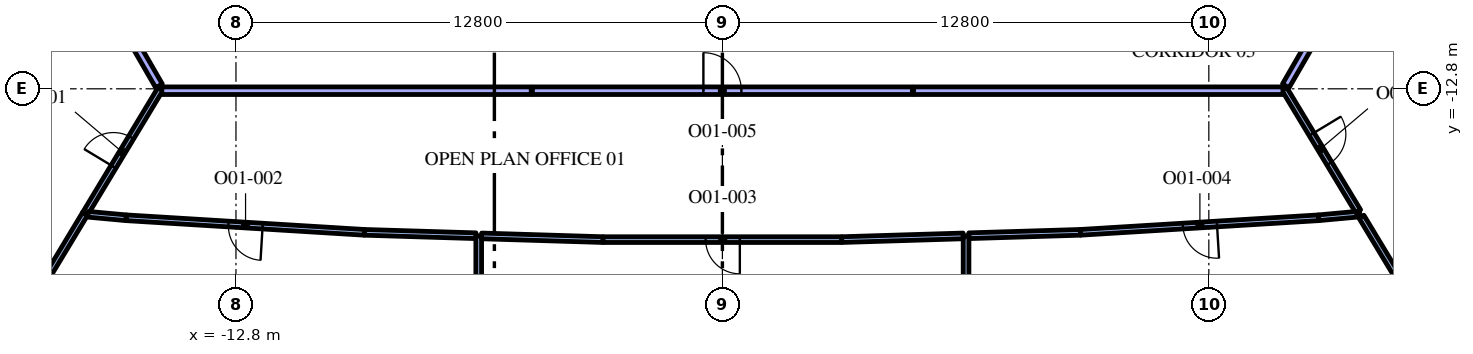
"""IFC4 building model, lengths in metres.
Left out: names, types, materials, properties, quantities, classifications, styles, units other than length and angle.
Written with IfcOpenShell. Run it as: python <this file> out.ifc"""

import sys

from ifc_helpers import new_model, si_unit, direction, frame, frame_2d, origin, place, context, subcontext, project, spatial, rectangle, extrude, element, fill, save


model = new_model("IFC4")
c1 = context("Model", 3, precision=1e-05, world=origin(), true_north=direction((0.0, 1.0)))
c2 = subcontext(c1, "Body", "Model", "MODEL_VIEW")
j1 = project(units=[si_unit("LENGTHUNIT", "METRE"), si_unit("PLANEANGLEUNIT", "RADIAN")], contexts=[c1])
p1 = place(None, origin())
s1 = spatial("IfcSite", under=j1, at=p1, CompositionType="ELEMENT")
p2 = place(p1, origin())
s2 = spatial("IfcBuilding", under=s1, at=p2, CompositionType="ELEMENT")
p3 = place(p2, frame((0.0, 0.0, 145.8)))
s3 = spatial("IfcBuildingStorey", under=s2, at=p3, CompositionType="ELEMENT", Elevation=145.8)
p4 = place(p3, frame((-16.771, -16.09, 0.0), z_axis=(0.0, 0.0, 1.0), x_axis=(-0.516817512045, -0.856095590015, 0.0)))
e1 = element("IfcWall", 1, at=p4, inside=s3, PredefinedType="PARTITIONING", context=c2, shape_type="SweptSolid", body=[
    extrude(rectangle(XDim=4.45, YDim=0.15, at=frame_2d((2.225, 0.0))), origin(), (0.0, 0.0, 1.0), 3.15),
])
p5 = place(p3, frame((-16.775, -16.097, 0.0), z_axis=(0.0, 0.0, 1.0), x_axis=(0.516793803756, 0.856109902057, 0.0)))
e2 = element("IfcWall", 2, at=p5, inside=s3, PredefinedType="PARTITIONING", context=c2, shape_type="SweptSolid", body=[
    extrude(rectangle(XDim=3.856, YDim=0.15, at=frame_2d((1.928, 0.0))), origin(), (0.0, 0.0, 1.0), 3.15),
])
p6 = place(p5, frame((1.456, 0.0, 0.0)))
e3 = element("IfcOpeningElement", 3, at=p6, cuts=e2, PredefinedType="OPENING", context=c2, shape_type="SweptSolid", body=[
    extrude(rectangle(XDim=0.9, YDim=2.1, at=frame_2d((0.45, 1.05))), frame((0.0, 0.085, 0.0), z_axis=(0.0, -1.0, 0.0), x_axis=(1.0, 0.0, 0.0)), (0.0, 0.0, 1.0), 0.17),
])
p7 = place(p3, frame((-25.421, -14.677, 0.0), z_axis=(0.0, 0.0, 1.0), x_axis=(0.866031435434, 0.499989552732, 0.0)))
e4 = element("IfcWall", 4, at=p7, inside=s3, PredefinedType="PARTITIONING", context=c2, shape_type="SweptSolid", body=[
    extrude(rectangle(XDim=10.154, YDim=0.2, at=frame_2d((5.077, 0.0))), origin(), (0.0, 0.0, 1.0), 3.15),
])
p8 = place(p3, frame((-16.578, -9.687, 0.0), z_axis=(0.0, 0.0, 1.0), x_axis=(0.499981686864, -0.86603597662, 0.0)))
e5 = element("IfcWall", 5, at=p8, inside=s3, PredefinedType="PARTITIONING", context=c2, shape_type="SweptSolid", body=[
    extrude(rectangle(XDim=3.506, YDim=0.2, at=frame_2d((1.753, 0.0))), origin(), (0.0, 0.0, 1.0), 3.15),
])
p9 = place(p3, frame((-6.412, -16.668, 0.0), z_axis=(0.0, 0.0, 1.0), x_axis=(0.0, -1.0, 0.0)))
e6 = element("IfcWall", 6, at=p9, inside=s3, PredefinedType="PARTITIONING", context=c2, shape_type="SweptSolid", body=[
    extrude(rectangle(XDim=4.002, YDim=0.15, at=frame_2d((2.001, 0.0))), origin(), (0.0, 0.0, 1.0), 3.15),
])
p10 = place(p3, frame((-16.69, -16.102, 0.0), z_axis=(0.0, 0.0, 1.0), x_axis=(0.995818997537, -0.091348366946, 0.0)))
e7 = element("IfcWall", 7, at=p10, inside=s3, PredefinedType="PARTITIONING", context=c2, shape_type="SweptSolid", body=[
    extrude(rectangle(XDim=1.002, YDim=0.15, at=frame_2d((0.501, 0.0))), origin(), (0.0, 0.0, 1.0), 3.15),
])
p11 = place(p3, frame((-9.421, -16.576, 0.0), z_axis=(0.0, 0.0, 1.0), x_axis=(-0.998137075468, 0.061011298754, 0.0)))
e8 = element("IfcWall", 8, at=p11, inside=s3, PredefinedType="PARTITIONING", context=c2, shape_type="SweptSolid", body=[
    extrude(rectangle(XDim=6.282, YDim=0.15, at=frame_2d((3.141, 0.0))), origin(), (0.0, 0.0, 1.0), 3.15),
])
p12 = place(p11, frame((2.683, 0.0, 0.0)))
e9 = element("IfcOpeningElement", 9, at=p12, cuts=e8, PredefinedType="OPENING", context=c2, shape_type="SweptSolid", body=[
    extrude(rectangle(XDim=0.9, YDim=2.1, at=frame_2d((0.45, 1.05))), frame((0.0, 0.085, 0.0), z_axis=(0.0, -1.0, 0.0), x_axis=(1.0, 0.0, 0.0)), (0.0, 0.0, 1.0), 0.17),
])
p13 = place(p3, frame((-9.421, -16.576, 0.0), z_axis=(0.0, 0.0, 1.0), x_axis=(0.999533978083, -0.030525835896, 0.0)))
e10 = element("IfcWall", 10, at=p13, inside=s3, PredefinedType="PARTITIONING", context=c2, shape_type="SweptSolid", body=[
    extrude(rectangle(XDim=2.935, YDim=0.15, at=frame_2d((1.468, 0.0))), origin(), (0.0, 0.0, 1.0), 3.15),
])
p14 = place(p3, frame((6.412, -16.668, 0.0), z_axis=(0.0, 0.0, 1.0), x_axis=(0.0, -1.0, 0.0)))
e11 = element("IfcWall", 11, at=p14, inside=s3, PredefinedType="PARTITIONING", context=c2, shape_type="SweptSolid", body=[
    extrude(rectangle(XDim=4.002, YDim=0.15, at=frame_2d((2.001, 0.0))), origin(), (0.0, 0.0, 1.0), 3.15),
])
p15 = place(p3, frame((-6.337, -16.671, 0.0), z_axis=(0.0, 0.0, 1.0), x_axis=(0.999533369646, -0.030545751995, 0.0)))
e12 = element("IfcWall", 12, at=p15, inside=s3, PredefinedType="PARTITIONING", context=c2, shape_type="SweptSolid", body=[
    extrude(rectangle(XDim=3.197, YDim=0.15, at=frame_2d((1.599, 0.0))), origin(), (0.0, 0.0, 1.0), 3.15),
])
p16 = place(p3, frame((3.141, -16.768, 0.0), z_axis=(0.0, 0.0, 1.0), x_axis=(-1.0, 0.0, 0.0)))
e13 = element("IfcWall", 13, at=p16, inside=s3, PredefinedType="PARTITIONING", context=c2, shape_type="SweptSolid", body=[
    extrude(rectangle(XDim=6.283, YDim=0.15, at=frame_2d((3.141, 0.0))), origin(), (0.0, 0.0, 1.0), 3.15),
])
p17 = place(p16, frame((2.683, 0.0, 0.0)))
e14 = element("IfcOpeningElement", 14, at=p17, cuts=e13, PredefinedType="OPENING", context=c2, shape_type="SweptSolid", body=[
    extrude(rectangle(XDim=0.9, YDim=2.1, at=frame_2d((0.45, 1.05))), frame((0.0, 0.085, 0.0), z_axis=(0.0, -1.0, 0.0), x_axis=(1.0, 0.0, 0.0)), (0.0, 0.0, 1.0), 0.17),
])
p18 = place(p3, frame((3.141, -16.768, 0.0), z_axis=(0.0, 0.0, 1.0), x_axis=(0.999533369646, 0.030545751995, 0.0)))
e15 = element("IfcWall", 15, at=p18, inside=s3, PredefinedType="PARTITIONING", context=c2, shape_type="SweptSolid", body=[
    extrude(rectangle(XDim=3.197, YDim=0.15, at=frame_2d((1.599, 0.0))), origin(), (0.0, 0.0, 1.0), 3.15),
])
p19 = place(p3, frame((6.487, -16.666, 0.0), z_axis=(0.0, 0.0, 1.0), x_axis=(0.999533978083, 0.030525835896, 0.0)))
e16 = element("IfcWall", 16, at=p19, inside=s3, PredefinedType="PARTITIONING", context=c2, shape_type="SweptSolid", body=[
    extrude(rectangle(XDim=2.935, YDim=0.15, at=frame_2d((1.468, 0.0))), origin(), (0.0, 0.0, 1.0), 3.15),
])
p20 = place(p3, frame((15.692, -16.193, 0.0), z_axis=(0.0, 0.0, 1.0), x_axis=(-0.998137075468, -0.061011298754, 0.0)))
e17 = element("IfcWall", 17, at=p20, inside=s3, PredefinedType="PARTITIONING", context=c2, shape_type="SweptSolid", body=[
    extrude(rectangle(XDim=6.282, YDim=0.15, at=frame_2d((3.141, 0.0))), origin(), (0.0, 0.0, 1.0), 3.15),
])
p21 = place(p20, frame((2.683, 0.0, 0.0)))
e18 = element("IfcOpeningElement", 18, at=p21, cuts=e17, PredefinedType="OPENING", context=c2, shape_type="SweptSolid", body=[
    extrude(rectangle(XDim=0.9, YDim=2.1, at=frame_2d((0.45, 1.05))), frame((0.0, 0.085, 0.0), z_axis=(0.0, -1.0, 0.0), x_axis=(1.0, 0.0, 0.0)), (0.0, 0.0, 1.0), 0.17),
])
p22 = place(p3, frame((15.692, -16.193, 0.0), z_axis=(0.0, 0.0, 1.0), x_axis=(0.995822859979, 0.091306251389, 0.0)))
e19 = element("IfcWall", 19, at=p22, inside=s3, PredefinedType="PARTITIONING", context=c2, shape_type="SweptSolid", body=[
    extrude(rectangle(XDim=1.086, YDim=0.15, at=frame_2d((0.543, 0.0))), origin(), (0.0, 0.0, 1.0), 3.15),
])
p23 = place(p3, frame((16.816, -16.165, 0.0), z_axis=(0.0, 0.0, 1.0), x_axis=(0.516814925326, -0.85609715159, 0.0)))
e20 = element("IfcWall", 20, at=p23, inside=s3, PredefinedType="PARTITIONING", context=c2, shape_type="SweptSolid", body=[
    extrude(rectangle(XDim=4.362, YDim=0.15, at=frame_2d((2.181, 0.0))), origin(), (0.0, 0.0, 1.0), 3.15),
])
p24 = place(p3, frame((14.782, -12.796, 0.0), z_axis=(0.0, 0.0, 1.0), x_axis=(0.516809076879, -0.856100682196, 0.0)))
e21 = element("IfcWall", 21, at=p24, inside=s3, PredefinedType="PARTITIONING", context=c2, shape_type="SweptSolid", body=[
    extrude(rectangle(XDim=3.768, YDim=0.15, at=frame_2d((1.884, 0.0))), origin(), (0.0, 0.0, 1.0), 3.15),
])
p25 = place(p24, frame((1.4, 0.0, 0.0)))
e22 = element("IfcOpeningElement", 22, at=p25, cuts=e21, PredefinedType="OPENING", context=c2, shape_type="SweptSolid", body=[
    extrude(rectangle(XDim=0.9, YDim=2.1, at=frame_2d((0.45, 1.05))), frame((0.0, 0.085, 0.0), z_axis=(0.0, -1.0, 0.0), x_axis=(1.0, 0.0, 0.0)), (0.0, 0.0, 1.0), 0.17),
])
p26 = place(p3, frame((-5.0, -12.85, 0.0), z_axis=(0.0, 0.0, 1.0), x_axis=(1.0, 0.0, 0.0)))
e23 = element("IfcWall", 23, at=p26, inside=s3, PredefinedType="PARTITIONING", context=c2, shape_type="SweptSolid", body=[
    extrude(rectangle(XDim=10.0, YDim=0.2, at=frame_2d((5.0, 0.0))), origin(), (0.0, 0.0, 1.0), 3.15),
])
p27 = place(p26, frame((4.5, 0.0, 0.0)))
e24 = element("IfcOpeningElement", 24, at=p27, cuts=e23, PredefinedType="OPENING", context=c2, shape_type="SweptSolid", body=[
    extrude(rectangle(XDim=1.0, YDim=2.1, at=frame_2d((0.5, 1.05))), frame((0.0, 0.11, 0.0), z_axis=(0.0, -1.0, 0.0), x_axis=(1.0, 0.0, 0.0)), (0.0, 0.0, 1.0), 0.22),
])
for number, where, z_axis, x_axis in (
    (25, (-14.751, -12.85, 0.0), (0.0, 0.0, 1.0), (1.0, 0.0, 0.0)),
    (26, (5.03, -12.85, 0.0), (0.0, 0.0, 1.0), (1.0, 0.0, 0.0)),
):
    element("IfcWall", number, at=place(p3, frame(where, z_axis=z_axis, x_axis=x_axis)), inside=s3, PredefinedType="PARTITIONING", context=c2, shape_type="SweptSolid", body=[
        extrude(rectangle(XDim=9.721, YDim=0.2, at=frame_2d((4.861, 0.0))), origin(), (0.0, 0.0, 1.0), 3.15),
    ])
p28 = place(p3, frame((16.628, -9.6, 0.0), z_axis=(0.0, 0.0, 1.0), x_axis=(0.866031435434, -0.499989552732, 0.0)))
e27 = element("IfcWall", 27, at=p28, inside=s3, PredefinedType="PARTITIONING", context=c2, shape_type="SweptSolid", body=[
    extrude(rectangle(XDim=10.154, YDim=0.2, at=frame_2d((5.077, 0.0))), origin(), (0.0, 0.0, 1.0), 3.15),
])
p29 = place(p3, frame((14.825, -12.722, 0.0), z_axis=(0.0, 0.0, 1.0), x_axis=(0.499981686864, 0.86603597662, 0.0)))
e28 = element("IfcWall", 28, at=p29, inside=s3, PredefinedType="PARTITIONING", context=c2, shape_type="SweptSolid", body=[
    extrude(rectangle(XDim=3.506, YDim=0.2, at=frame_2d((1.753, 0.0))), origin(), (0.0, 0.0, 1.0), 3.15),
])
p30 = place(p6, origin())
e29 = element("IfcDoor", 29, at=p30, inside=s3, OperationType="SINGLE_SWING_LEFT", PredefinedType="DOOR", context=c2, shape_type="SweptSolid", body=[
    extrude(rectangle(XDim=0.9, YDim=2.1, at=frame_2d((0.45, 1.05))), frame((0.0, 0.025, 0.0), z_axis=(0.0, -1.0, 0.0), x_axis=(1.0, 0.0, 0.0)), (0.0, 0.0, 1.0), 0.05),
])
fill(e3, e29)
p31 = place(p12, origin())
e30 = element("IfcDoor", 30, at=p31, inside=s3, OperationType="SINGLE_SWING_LEFT", PredefinedType="DOOR", context=c2, shape_type="SweptSolid", body=[
    extrude(rectangle(XDim=0.9, YDim=2.1, at=frame_2d((0.45, 1.05))), frame((0.0, 0.025, 0.0), z_axis=(0.0, -1.0, 0.0), x_axis=(1.0, 0.0, 0.0)), (0.0, 0.0, 1.0), 0.05),
])
fill(e9, e30)
p32 = place(p17, origin())
e31 = element("IfcDoor", 31, at=p32, inside=s3, OperationType="SINGLE_SWING_LEFT", PredefinedType="DOOR", context=c2, shape_type="SweptSolid", body=[
    extrude(rectangle(XDim=0.9, YDim=2.1, at=frame_2d((0.45, 1.05))), frame((0.0, 0.025, 0.0), z_axis=(0.0, -1.0, 0.0), x_axis=(1.0, 0.0, 0.0)), (0.0, 0.0, 1.0), 0.05),
])
fill(e14, e31)
p33 = place(p21, origin())
e32 = element("IfcDoor", 32, at=p33, inside=s3, OperationType="SINGLE_SWING_LEFT", PredefinedType="DOOR", context=c2, shape_type="SweptSolid", body=[
    extrude(rectangle(XDim=0.9, YDim=2.1, at=frame_2d((0.45, 1.05))), frame((0.0, 0.025, 0.0), z_axis=(0.0, -1.0, 0.0), x_axis=(1.0, 0.0, 0.0)), (0.0, 0.0, 1.0), 0.05),
])
fill(e18, e32)
p34 = place(p27, origin())
e33 = element("IfcDoor", 33, at=p34, inside=s3, OperationType="SINGLE_SWING_RIGHT", PredefinedType="DOOR", context=c2, shape_type="SweptSolid", body=[
    extrude(rectangle(XDim=1.0, YDim=2.1, at=frame_2d((0.5, 1.05))), frame((0.0, 0.025, 0.0), z_axis=(0.0, -1.0, 0.0), x_axis=(1.0, 0.0, 0.0)), (0.0, 0.0, 1.0), 0.05),
])
fill(e24, e33)
p35 = place(p25, origin())
e34 = element("IfcDoor", 34, at=p35, inside=s3, OperationType="SINGLE_SWING_LEFT", PredefinedType="DOOR", context=c2, shape_type="SweptSolid", body=[
    extrude(rectangle(XDim=0.9, YDim=2.1, at=frame_2d((0.45, 1.05))), frame((0.0, 0.025, 0.0), z_axis=(0.0, -1.0, 0.0), x_axis=(1.0, 0.0, 0.0)), (0.0, 0.0, 1.0), 0.05),
])
fill(e22, e34)
save(model, sys.argv[1])
